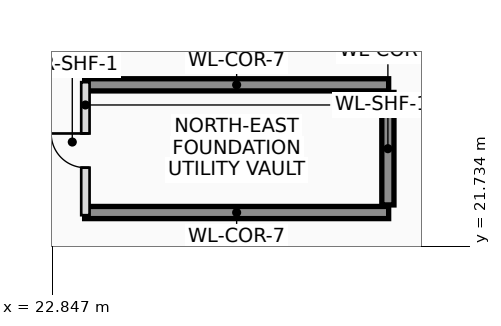
"""IFC4 building model, lengths in metres.
Left out: names, types, materials, properties, quantities, classifications, styles, units other than length and angle.
Written with IfcOpenShell. Run it as: python <this file> out.ifc"""

import sys

from ifc_helpers import new_model, si_unit, direction, frame, frame_2d, origin, place, context, subcontext, project, spatial, rectangle, extrude, element, fill, save


model = new_model("IFC4")
c1 = context("Model", 3, precision=1e-05, world=origin(), true_north=direction((0.0, 1.0)))
c2 = subcontext(c1, "Body", "Model", "MODEL_VIEW")
j1 = project(units=[si_unit("LENGTHUNIT", "METRE"), si_unit("PLANEANGLEUNIT", "RADIAN")], contexts=[c1])
p1 = place(None, origin())
s1 = spatial("IfcSite", under=j1, at=p1, CompositionType="ELEMENT")
p2 = place(p1, origin())
s2 = spatial("IfcBuilding", under=s1, at=p2, CompositionType="ELEMENT")
p3 = place(p2, frame((0.0, 0.0, -9.6)))
s3 = spatial("IfcBuildingStorey", under=s2, at=p3, CompositionType="ELEMENT", Elevation=-9.6)
for number, where, z_axis, x_axis in (
    (1, (23.7, 25.98, 0.0), (0.0, 0.0, 1.0), (1.0, 0.0, 0.0)),
    (2, (23.7, 22.62, 0.0), (0.0, 0.0, 1.0), (1.0, 0.0, 0.0)),
):
    element("IfcWall", number, at=place(p3, frame(where, z_axis=z_axis, x_axis=x_axis)), inside=s3, PredefinedType="SHEAR", context=c2, shape_type="SweptSolid", body=[
        extrude(rectangle(XDim=8.0, YDim=0.32, at=frame_2d((4.0, 0.0))), origin(), (0.0, 0.0, 1.0), 4.8),
    ])
p4 = place(p3, frame((31.68, 22.82, 0.0), z_axis=(0.0, 0.0, 1.0), x_axis=(0.0, 1.0, 0.0)))
e3 = element("IfcWall", 3, at=p4, inside=s3, PredefinedType="SHEAR", context=c2, shape_type="SweptSolid", body=[
    extrude(rectangle(XDim=2.96, YDim=0.32, at=frame_2d((1.48, 0.0))), origin(), (0.0, 0.0, 1.0), 4.8),
])
p5 = place(p3, frame((23.72, 22.55, 0.0), z_axis=(0.0, 0.0, 1.0), x_axis=(0.0, 1.0, 0.0)))
e4 = element("IfcWall", 4, at=p5, inside=s3, PredefinedType="PLUMBINGWALL", context=c2, shape_type="SweptSolid", body=[
    extrude(rectangle(XDim=3.5, YDim=0.22, at=frame_2d((1.75, 0.0))), origin(), (0.0, 0.0, 1.0), 4.52),
])
p6 = place(p5, frame((1.25, 0.0, 0.0)))
e5 = element("IfcOpeningElement", 5, at=p6, cuts=e4, PredefinedType="OPENING", context=c2, shape_type="SweptSolid", body=[
    extrude(rectangle(XDim=0.9, YDim=2.05, at=frame_2d((0.45, 1.025))), frame((0.0, 0.12, 0.0), z_axis=(0.0, -1.0, 0.0), x_axis=(1.0, 0.0, 0.0)), (0.0, 0.0, 1.0), 0.24),
])
p7 = place(p6, origin())
e6 = element("IfcDoor", 6, at=p7, inside=s3, OperationType="SINGLE_SWING_RIGHT", PredefinedType="DOOR", context=c2, shape_type="SweptSolid", body=[
    extrude(rectangle(XDim=0.9, YDim=2.05, at=frame_2d((0.45, 1.025))), frame((0.0, 0.025, 0.0), z_axis=(0.0, -1.0, 0.0), x_axis=(1.0, 0.0, 0.0)), (0.0, 0.0, 1.0), 0.05),
])
fill(e5, e6)
save(model, sys.argv[1])
